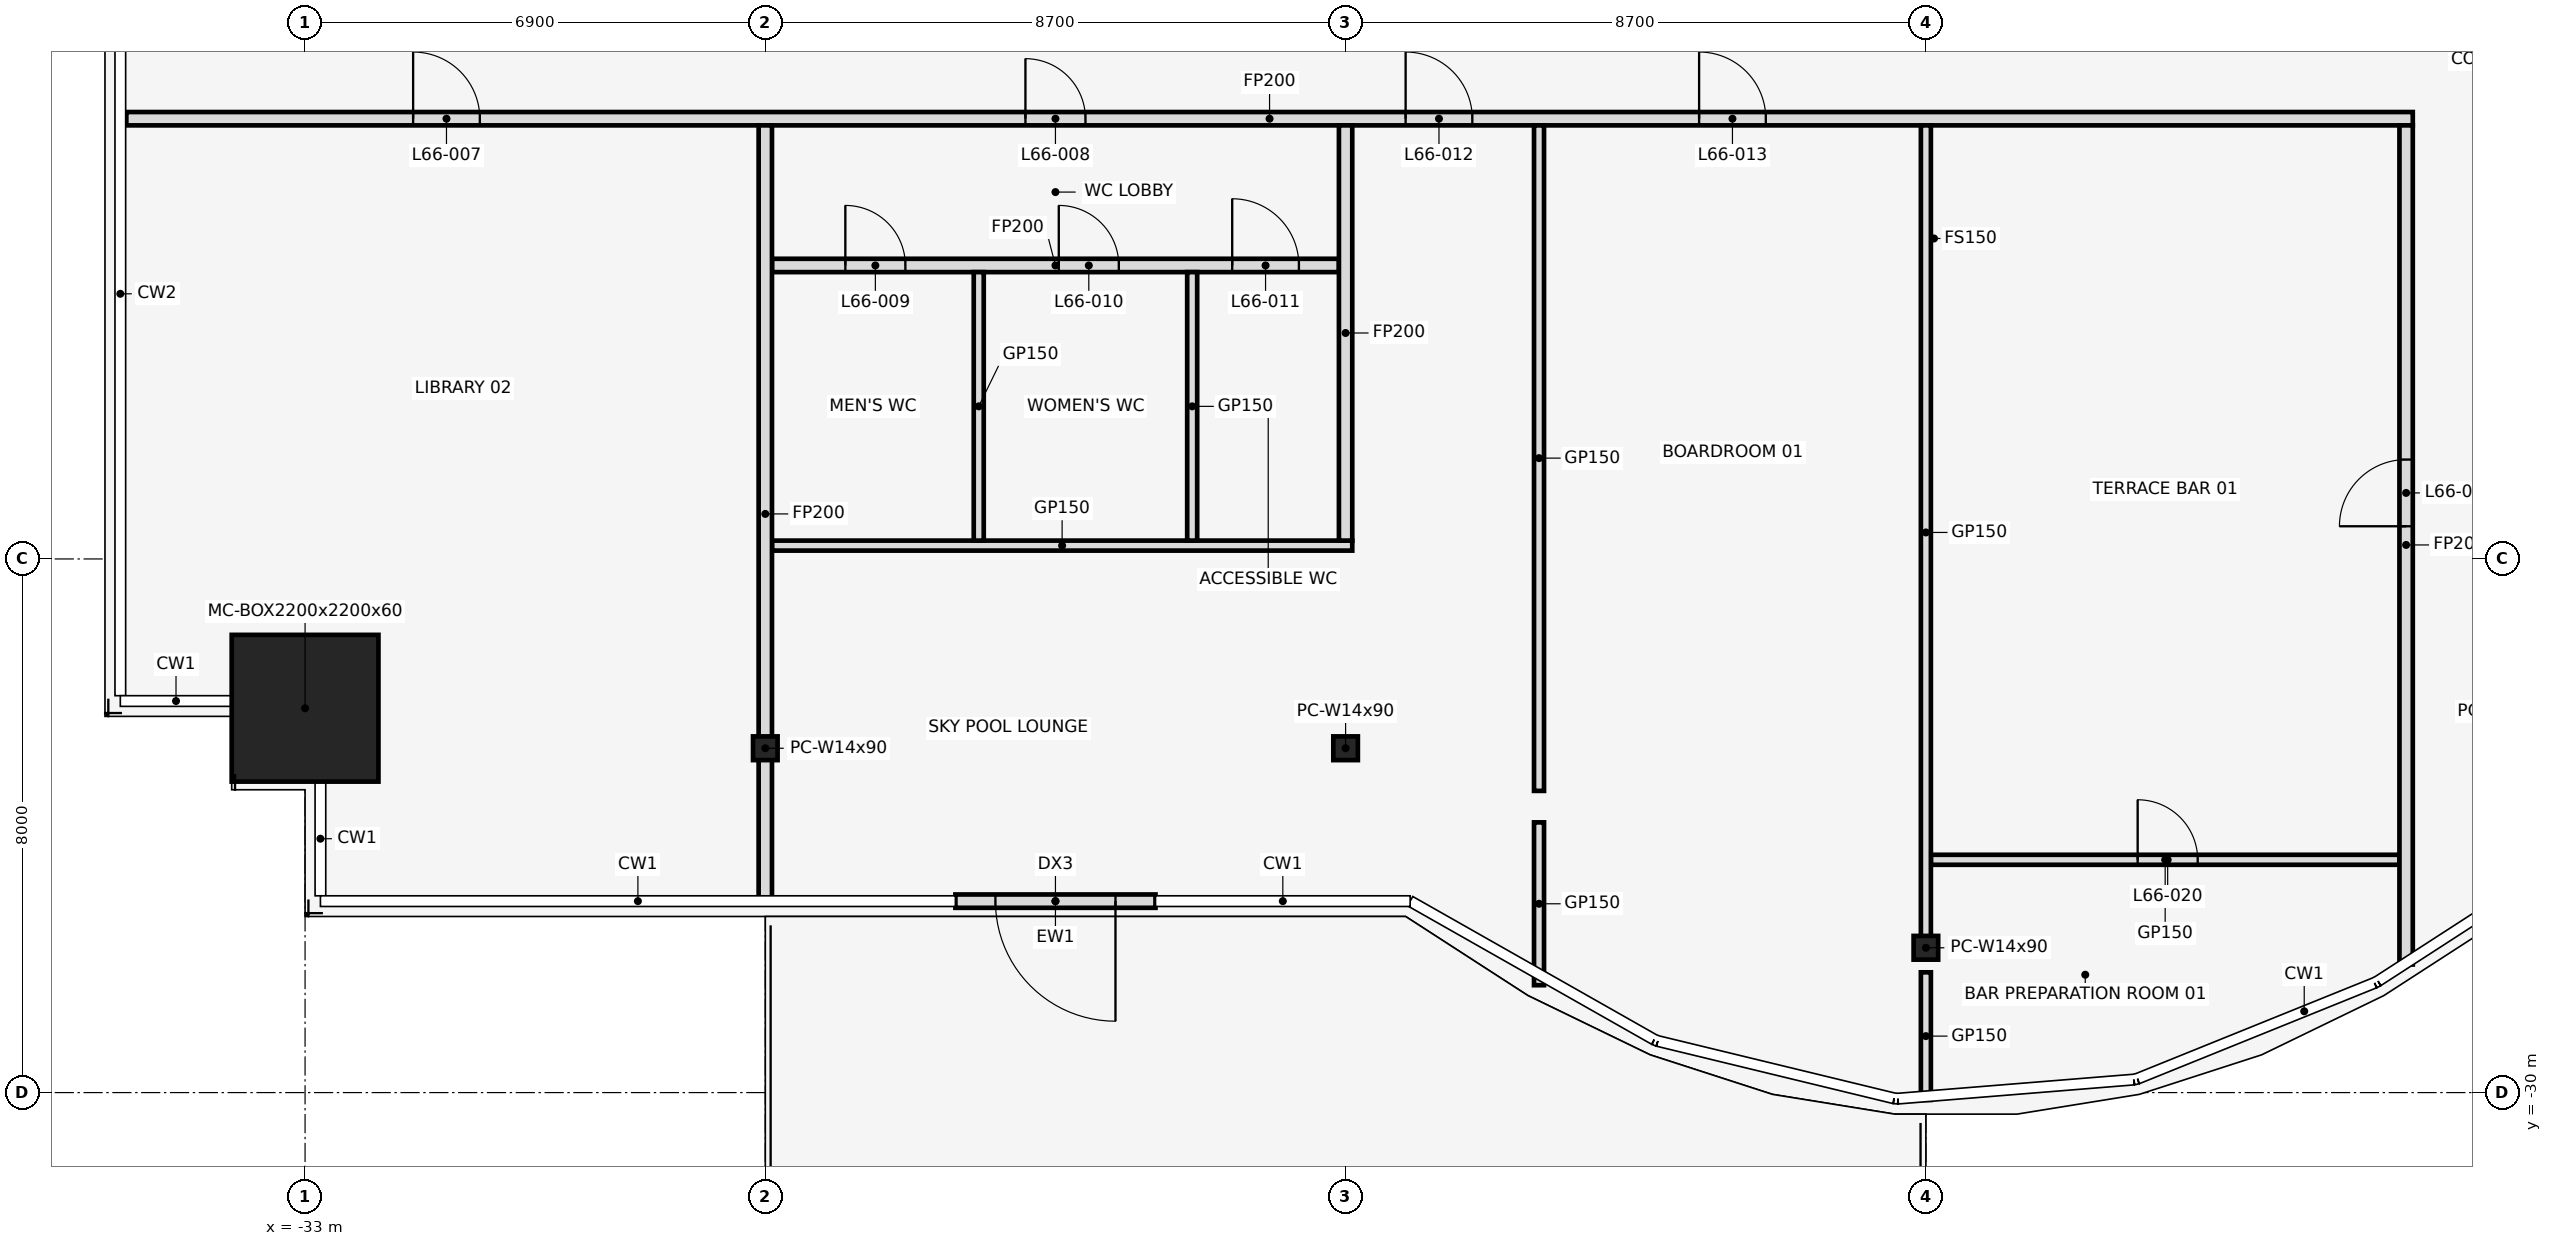
"""IFC4 building model, lengths in metres.
Left out: names, types, materials, properties, quantities, classifications, styles, units other than length and angle.
Written with IfcOpenShell. Run it as: python <this file> out.ifc"""

import sys

from ifc_helpers import new_model, si_unit, direction, frame, frame_2d, origin, origin_2d, place, context, subcontext, project, spatial, rectangle, hollow_rectangle, i_section, extrude, element, fill, save


model = new_model("IFC4")
c1 = context("Model", 3, precision=1e-05, world=origin(), true_north=direction((0.0, 1.0)))
c2 = subcontext(c1, "Body", "Model", "MODEL_VIEW")
j1 = project(units=[si_unit("LENGTHUNIT", "METRE"), si_unit("PLANEANGLEUNIT", "RADIAN")], contexts=[c1])
p1 = place(None, origin())
s1 = spatial("IfcSite", under=j1, at=p1, CompositionType="ELEMENT")
p2 = place(p1, origin())
s2 = spatial("IfcBuilding", under=s1, at=p2, CompositionType="ELEMENT")
p3 = place(p2, frame((0.0, 0.0, 293.0)))
s3 = spatial("IfcBuildingStorey", under=s2, at=p3, CompositionType="ELEMENT", Elevation=293.0)
p4 = place(p3, frame((-33.0, -24.238, 0.0), z_axis=(0.0, 0.0, 1.0), x_axis=(1.0, 0.0, 0.0)))
e1 = element("IfcColumn", 1, at=p4, inside=s3, PredefinedType="COLUMN", context=c2, shape_type="SweptSolid", body=[
    extrude(hollow_rectangle(XDim=2.2, YDim=2.2, WallThickness=0.06, at=origin_2d()), origin(), (0.0, 0.0, 1.0), 4.5),
])
for number, where, z_axis, x_axis in (
    (2, (-26.1, -24.838, 0.0), (0.0, 0.0, 1.0), (1.0, 0.0, 0.0)),
    (3, (-17.4, -24.838, 0.0), (0.0, 0.0, 1.0), (1.0, 0.0, 0.0)),
    (4, (-8.7, -27.829, 0.0), (0.0, 0.0, 1.0), (1.0, 0.0, 0.0)),
):
    element("IfcColumn", number, at=place(p3, frame(where, z_axis=z_axis, x_axis=x_axis)), inside=s3, PredefinedType="COLUMN", context=c2, shape_type="SweptSolid", body=[
        extrude(i_section(OverallWidth=0.368, OverallDepth=0.356, WebThickness=0.011, FlangeThickness=0.018, at=origin_2d()), origin(), (0.0, 0.0, 1.0), 4.5),
    ])
p5 = place(p3, frame((-20.25, -27.13, 0.0), z_axis=(0.0, 0.0, 1.0), x_axis=(-1.0, 0.0, 0.0)))
e5 = element("IfcWall", 5, at=p5, inside=s3, PredefinedType="STANDARD", context=c2, shape_type="SweptSolid", body=[
    extrude(rectangle(XDim=3.0, YDim=0.2, at=frame_2d((1.5, 0.0))), origin(), (0.0, 0.0, 1.0), 4.35),
])
p6 = place(p5, frame((0.6, 0.0, 0.0)))
e6 = element("IfcOpeningElement", 6, at=p6, cuts=e5, PredefinedType="OPENING", context=c2, shape_type="SweptSolid", body=[
    extrude(rectangle(XDim=1.8, YDim=2.4, at=frame_2d((0.9, 1.2))), frame((0.0, 0.112, 0.0), z_axis=(0.0, -1.0, 0.0), x_axis=(1.0, 0.0, 0.0)), (0.0, 0.0, 1.0), 0.224),
])
p7 = place(p3, frame((-8.625, -26.51, 0.0), z_axis=(0.0, 0.0, 1.0), x_axis=(1.0, 0.0, 0.0)))
e7 = element("IfcWall", 7, at=p7, inside=s3, PredefinedType="PARTITIONING", context=c2, shape_type="SweptSolid", body=[
    extrude(rectangle(XDim=7.025, YDim=0.15, at=frame_2d((3.512, 0.0))), origin(), (0.0, 0.0, 1.0), 3.418),
])
p8 = place(p7, frame((3.1, 0.0, 0.0)))
e8 = element("IfcOpeningElement", 8, at=p8, cuts=e7, PredefinedType="OPENING", context=c2, shape_type="SweptSolid", body=[
    extrude(rectangle(XDim=0.9, YDim=2.1, at=frame_2d((0.45, 1.05))), frame((0.0, 0.087, 0.0), z_axis=(0.0, -1.0, 0.0), x_axis=(1.0, 0.0, 0.0)), (0.0, 0.0, 1.0), 0.174),
])
p9 = place(p3, frame((-26.0, -21.8, 0.0), z_axis=(0.0, 0.0, 1.0), x_axis=(1.0, 0.0, 0.0)))
e9 = element("IfcWall", 9, at=p9, inside=s3, PredefinedType="PARTITIONING", context=c2, shape_type="SweptSolid", body=[
    extrude(rectangle(XDim=8.7, YDim=0.15, at=frame_2d((4.35, 0.0))), origin(), (0.0, 0.0, 1.0), 3.418),
])
p10 = place(p3, frame((-26.0, -17.6, 0.0), z_axis=(0.0, 0.0, 1.0), x_axis=(1.0, 0.0, 0.0)))
e10 = element("IfcWall", 10, at=p10, inside=s3, PredefinedType="PARTITIONING", context=c2, shape_type="SweptSolid", body=[
    extrude(rectangle(XDim=8.5, YDim=0.2, at=frame_2d((4.25, 0.0))), origin(), (0.0, 0.0, 1.0), 3.418),
])
p11 = place(p10, frame((1.1, 0.0, 0.0)))
e11 = element("IfcOpeningElement", 11, at=p11, cuts=e10, PredefinedType="OPENING", context=c2, shape_type="SweptSolid", body=[
    extrude(rectangle(XDim=0.9, YDim=2.1, at=frame_2d((0.45, 1.05))), frame((0.0, 0.112, 0.0), z_axis=(0.0, -1.0, 0.0), x_axis=(1.0, 0.0, 0.0)), (0.0, 0.0, 1.0), 0.224),
])
p12 = place(p10, frame((4.3, 0.0, 0.0)))
e12 = element("IfcOpeningElement", 12, at=p12, cuts=e10, PredefinedType="OPENING", context=c2, shape_type="SweptSolid", body=[
    extrude(rectangle(XDim=0.9, YDim=2.1, at=frame_2d((0.45, 1.05))), frame((0.0, 0.112, 0.0), z_axis=(0.0, -1.0, 0.0), x_axis=(1.0, 0.0, 0.0)), (0.0, 0.0, 1.0), 0.224),
])
p13 = place(p10, frame((6.9, 0.0, 0.0)))
e13 = element("IfcOpeningElement", 13, at=p13, cuts=e10, PredefinedType="OPENING", context=c2, shape_type="SweptSolid", body=[
    extrude(rectangle(XDim=1.0, YDim=2.1, at=frame_2d((0.5, 1.05))), frame((0.0, 0.112, 0.0), z_axis=(0.0, -1.0, 0.0), x_axis=(1.0, 0.0, 0.0)), (0.0, 0.0, 1.0), 0.224),
])
p14 = place(p3, frame((-35.68, -15.4, 0.0), z_axis=(0.0, 0.0, 1.0), x_axis=(1.0, 0.0, 0.0)))
e14 = element("IfcWall", 14, at=p14, inside=s3, PredefinedType="PARTITIONING", context=c2, shape_type="SweptSolid", body=[
    extrude(rectangle(XDim=34.28, YDim=0.2, at=frame_2d((17.14, 0.0))), origin(), (0.0, 0.0, 1.0), 3.418),
])
p15 = place(p14, frame((4.3, 0.0, 0.0)))
e15 = element("IfcOpeningElement", 15, at=p15, cuts=e14, PredefinedType="OPENING", context=c2, shape_type="SweptSolid", body=[
    extrude(rectangle(XDim=1.0, YDim=2.1, at=frame_2d((0.5, 1.05))), frame((0.0, 0.112, 0.0), z_axis=(0.0, -1.0, 0.0), x_axis=(1.0, 0.0, 0.0)), (0.0, 0.0, 1.0), 0.224),
])
p16 = place(p14, frame((13.48, 0.0, 0.0)))
e16 = element("IfcOpeningElement", 16, at=p16, cuts=e14, PredefinedType="OPENING", context=c2, shape_type="SweptSolid", body=[
    extrude(rectangle(XDim=0.9, YDim=2.1, at=frame_2d((0.45, 1.05))), frame((0.0, 0.112, 0.0), z_axis=(0.0, -1.0, 0.0), x_axis=(1.0, 0.0, 0.0)), (0.0, 0.0, 1.0), 0.224),
])
p17 = place(p14, frame((19.18, 0.0, 0.0)))
e17 = element("IfcOpeningElement", 17, at=p17, cuts=e14, PredefinedType="OPENING", context=c2, shape_type="SweptSolid", body=[
    extrude(rectangle(XDim=1.0, YDim=2.1, at=frame_2d((0.5, 1.05))), frame((0.0, 0.112, 0.0), z_axis=(0.0, -1.0, 0.0), x_axis=(1.0, 0.0, 0.0)), (0.0, 0.0, 1.0), 0.224),
])
p18 = place(p14, frame((23.58, 0.0, 0.0)))
e18 = element("IfcOpeningElement", 18, at=p18, cuts=e14, PredefinedType="OPENING", context=c2, shape_type="SweptSolid", body=[
    extrude(rectangle(XDim=1.0, YDim=2.1, at=frame_2d((0.5, 1.05))), frame((0.0, 0.112, 0.0), z_axis=(0.0, -1.0, 0.0), x_axis=(1.0, 0.0, 0.0)), (0.0, 0.0, 1.0), 0.224),
])
p19 = place(p3, frame((-26.1, -27.15, 0.0), z_axis=(0.0, 0.0, 1.0), x_axis=(0.0, 1.0, 0.0)))
e19 = element("IfcWall", 19, at=p19, inside=s3, PredefinedType="PARTITIONING", context=c2, shape_type="SweptSolid", body=[
    extrude(rectangle(XDim=11.65, YDim=0.2, at=frame_2d((5.825, 0.0))), origin(), (0.0, 0.0, 1.0), 3.418),
])
for number, where, z_axis, x_axis in (
    (20, (-22.9, -21.725, 0.0), (0.0, 0.0, 1.0), (0.0, 1.0, 0.0)),
    (21, (-19.7, -21.725, 0.0), (0.0, 0.0, 1.0), (0.0, 1.0, 0.0)),
):
    element("IfcWall", number, at=place(p3, frame(where, z_axis=z_axis, x_axis=x_axis)), inside=s3, PredefinedType="PARTITIONING", context=c2, shape_type="SweptSolid", body=[
        extrude(rectangle(XDim=4.025, YDim=0.15, at=frame_2d((2.013, 0.0))), origin(), (0.0, 0.0, 1.0), 3.418),
    ])
p20 = place(p3, frame((-17.4, -21.725, 0.0), z_axis=(0.0, 0.0, 1.0), x_axis=(0.0, 1.0, 0.0)))
e22 = element("IfcWall", 22, at=p20, inside=s3, PredefinedType="PARTITIONING", context=c2, shape_type="SweptSolid", body=[
    extrude(rectangle(XDim=6.225, YDim=0.2, at=frame_2d((3.113, 0.0))), origin(), (0.0, 0.0, 1.0), 3.418),
])
p21 = place(p3, frame((-14.5, -28.39, 0.0), z_axis=(0.0, 0.0, 1.0), x_axis=(0.0, 1.0, 0.0)))
e23 = element("IfcWall", 23, at=p21, inside=s3, PredefinedType="PARTITIONING", context=c2, shape_type="SweptSolid", body=[
    extrude(rectangle(XDim=2.441, YDim=0.15, at=frame_2d((1.22, 0.0))), origin(), (0.0, 0.0, 1.0), 3.418),
])
p22 = place(p3, frame((-14.5, -25.477, 0.0), z_axis=(0.0, 0.0, 1.0), x_axis=(0.0, 1.0, 0.0)))
e24 = element("IfcWall", 24, at=p22, inside=s3, PredefinedType="PARTITIONING", context=c2, shape_type="SweptSolid", body=[
    extrude(rectangle(XDim=9.977, YDim=0.15, at=frame_2d((4.989, 0.0))), origin(), (0.0, 0.0, 1.0), 3.418),
])
p23 = place(p3, frame((-8.7, -30.11, 0.0), z_axis=(0.0, 0.0, 1.0), x_axis=(0.0, 1.0, 0.0)))
e25 = element("IfcWall", 25, at=p23, inside=s3, PredefinedType="PARTITIONING", context=c2, shape_type="SweptSolid", body=[
    extrude(rectangle(XDim=1.913, YDim=0.15, at=frame_2d((0.957, 0.0))), origin(), (0.0, 0.0, 1.0), 3.418),
])
p24 = place(p3, frame((-8.7, -27.705, 0.0), z_axis=(0.0, 0.0, 1.0), x_axis=(0.0, 1.0, 0.0)))
e26 = element("IfcWall", 26, at=p24, inside=s3, PredefinedType="PARTITIONING", context=c2, shape_type="SweptSolid", body=[
    extrude(rectangle(XDim=12.205, YDim=0.15, at=frame_2d((6.103, 0.0))), origin(), (0.0, 0.0, 1.0), 3.418),
])
p25 = place(p3, frame((-1.5, -28.08, 0.0), z_axis=(0.0, 0.0, 1.0), x_axis=(0.0, 1.0, 0.0)))
e27 = element("IfcWall", 27, at=p25, inside=s3, PredefinedType="PARTITIONING", context=c2, shape_type="SweptSolid", body=[
    extrude(rectangle(XDim=12.58, YDim=0.2, at=frame_2d((6.29, 0.0))), origin(), (0.0, 0.0, 1.0), 3.418),
])
p26 = place(p25, frame((6.57, 0.0, 0.0)))
e28 = element("IfcOpeningElement", 28, at=p26, cuts=e27, PredefinedType="OPENING", context=c2, shape_type="SweptSolid", body=[
    extrude(rectangle(XDim=1.0, YDim=2.1, at=frame_2d((0.5, 1.05))), frame((0.0, 0.112, 0.0), z_axis=(0.0, -1.0, 0.0), x_axis=(1.0, 0.0, 0.0)), (0.0, 0.0, 1.0), 0.224),
])
p27 = place(p6, origin())
e29 = element("IfcDoor", 29, at=p27, inside=s3, OperationType="SINGLE_SWING_LEFT", PredefinedType="DOOR", context=c2, shape_type="SweptSolid", body=[
    extrude(rectangle(XDim=1.8, YDim=2.4, at=frame_2d((0.9, 1.2))), frame((0.0, 0.025, 0.0), z_axis=(0.0, -1.0, 0.0), x_axis=(1.0, 0.0, 0.0)), (0.0, 0.0, 1.0), 0.05),
])
fill(e6, e29)
p28 = place(p15, frame((1.0, 0.0, 0.0), z_axis=(0.0, 0.0, 1.0), x_axis=(-1.0, 0.0, 0.0)))
e30 = element("IfcDoor", 30, at=p28, inside=s3, OperationType="SINGLE_SWING_LEFT", PredefinedType="DOOR", context=c2, shape_type="SweptSolid", body=[
    extrude(rectangle(XDim=1.0, YDim=2.1, at=frame_2d((0.5, 1.05))), frame((0.0, 0.025, 0.0), z_axis=(0.0, -1.0, 0.0), x_axis=(1.0, 0.0, 0.0)), (0.0, 0.0, 1.0), 0.05),
])
fill(e15, e30)
p29 = place(p16, frame((0.9, 0.0, 0.0), z_axis=(0.0, 0.0, 1.0), x_axis=(-1.0, 0.0, 0.0)))
e31 = element("IfcDoor", 31, at=p29, inside=s3, OperationType="SINGLE_SWING_RIGHT", PredefinedType="DOOR", context=c2, shape_type="SweptSolid", body=[
    extrude(rectangle(XDim=0.9, YDim=2.1, at=frame_2d((0.45, 1.05))), frame((0.0, 0.025, 0.0), z_axis=(0.0, -1.0, 0.0), x_axis=(1.0, 0.0, 0.0)), (0.0, 0.0, 1.0), 0.05),
])
fill(e16, e31)
p30 = place(p11, frame((0.9, 0.0, 0.0), z_axis=(0.0, 0.0, 1.0), x_axis=(-1.0, 0.0, 0.0)))
e32 = element("IfcDoor", 32, at=p30, inside=s3, OperationType="SINGLE_SWING_RIGHT", PredefinedType="DOOR", context=c2, shape_type="SweptSolid", body=[
    extrude(rectangle(XDim=0.9, YDim=2.1, at=frame_2d((0.45, 1.05))), frame((0.0, 0.025, 0.0), z_axis=(0.0, -1.0, 0.0), x_axis=(1.0, 0.0, 0.0)), (0.0, 0.0, 1.0), 0.05),
])
fill(e11, e32)
p31 = place(p12, frame((0.9, 0.0, 0.0), z_axis=(0.0, 0.0, 1.0), x_axis=(-1.0, 0.0, 0.0)))
e33 = element("IfcDoor", 33, at=p31, inside=s3, OperationType="SINGLE_SWING_LEFT", PredefinedType="DOOR", context=c2, shape_type="SweptSolid", body=[
    extrude(rectangle(XDim=0.9, YDim=2.1, at=frame_2d((0.45, 1.05))), frame((0.0, 0.025, 0.0), z_axis=(0.0, -1.0, 0.0), x_axis=(1.0, 0.0, 0.0)), (0.0, 0.0, 1.0), 0.05),
])
fill(e12, e33)
p32 = place(p13, frame((1.0, 0.0, 0.0), z_axis=(0.0, 0.0, 1.0), x_axis=(-1.0, 0.0, 0.0)))
e34 = element("IfcDoor", 34, at=p32, inside=s3, OperationType="SINGLE_SWING_RIGHT", PredefinedType="DOOR", context=c2, shape_type="SweptSolid", body=[
    extrude(rectangle(XDim=1.0, YDim=2.1, at=frame_2d((0.5, 1.05))), frame((0.0, 0.025, 0.0), z_axis=(0.0, -1.0, 0.0), x_axis=(1.0, 0.0, 0.0)), (0.0, 0.0, 1.0), 0.05),
])
fill(e13, e34)
p33 = place(p17, frame((1.0, 0.0, 0.0), z_axis=(0.0, 0.0, 1.0), x_axis=(-1.0, 0.0, 0.0)))
e35 = element("IfcDoor", 35, at=p33, inside=s3, OperationType="SINGLE_SWING_RIGHT", PredefinedType="DOOR", context=c2, shape_type="SweptSolid", body=[
    extrude(rectangle(XDim=1.0, YDim=2.1, at=frame_2d((0.5, 1.05))), frame((0.0, 0.025, 0.0), z_axis=(0.0, -1.0, 0.0), x_axis=(1.0, 0.0, 0.0)), (0.0, 0.0, 1.0), 0.05),
])
fill(e17, e35)
p34 = place(p18, frame((1.0, 0.0, 0.0), z_axis=(0.0, 0.0, 1.0), x_axis=(-1.0, 0.0, 0.0)))
e36 = element("IfcDoor", 36, at=p34, inside=s3, OperationType="SINGLE_SWING_LEFT", PredefinedType="DOOR", context=c2, shape_type="SweptSolid", body=[
    extrude(rectangle(XDim=1.0, YDim=2.1, at=frame_2d((0.5, 1.05))), frame((0.0, 0.025, 0.0), z_axis=(0.0, -1.0, 0.0), x_axis=(1.0, 0.0, 0.0)), (0.0, 0.0, 1.0), 0.05),
])
fill(e18, e36)
p35 = place(p26, origin())
e37 = element("IfcDoor", 37, at=p35, inside=s3, OperationType="SINGLE_SWING_LEFT", PredefinedType="DOOR", context=c2, shape_type="SweptSolid", body=[
    extrude(rectangle(XDim=1.0, YDim=2.1, at=frame_2d((0.5, 1.05))), frame((0.0, 0.025, 0.0), z_axis=(0.0, -1.0, 0.0), x_axis=(1.0, 0.0, 0.0)), (0.0, 0.0, 1.0), 0.05),
])
fill(e28, e37)
p36 = place(p8, frame((0.9, 0.0, 0.0), z_axis=(0.0, 0.0, 1.0), x_axis=(-1.0, 0.0, 0.0)))
e38 = element("IfcDoor", 38, at=p36, inside=s3, OperationType="SINGLE_SWING_RIGHT", PredefinedType="DOOR", context=c2, shape_type="SweptSolid", body=[
    extrude(rectangle(XDim=0.9, YDim=2.1, at=frame_2d((0.45, 1.05))), frame((0.0, 0.025, 0.0), z_axis=(0.0, -1.0, 0.0), x_axis=(1.0, 0.0, 0.0)), (0.0, 0.0, 1.0), 0.05),
])
fill(e8, e38)
save(model, sys.argv[1])
